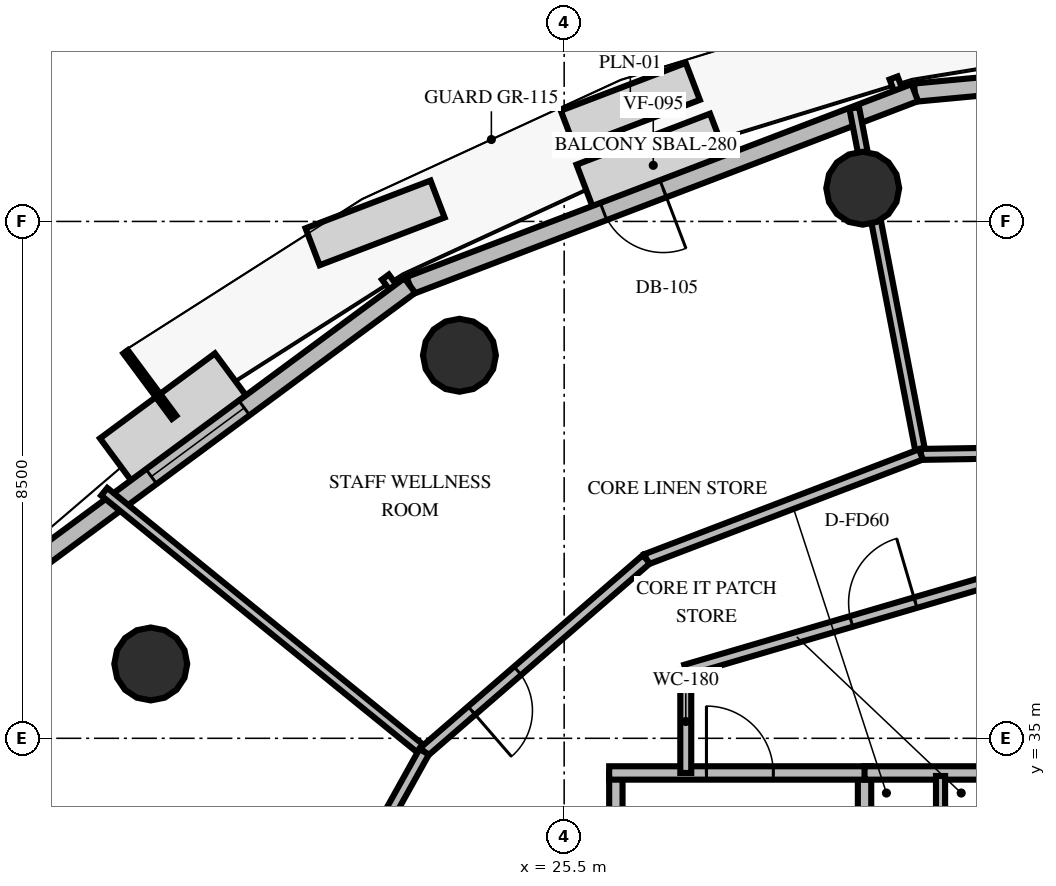
"""IFC4 building model, lengths in metres.
Left out: names, types, materials, properties, quantities, classifications, styles, units other than length and angle.
Written with IfcOpenShell. Run it as: python <this file> out.ifc"""

import sys

from ifc_helpers import new_model, si_unit, direction, frame, frame_2d, origin, origin_2d, place, context, subcontext, project, spatial, rectangle, circle, extrude, element, fill, save


model = new_model("IFC4")
c1 = context("Model", 3, precision=1e-05, world=origin(), true_north=direction((0.0, 1.0)))
c2 = subcontext(c1, "Body", "Model", "MODEL_VIEW")
j1 = project(units=[si_unit("LENGTHUNIT", "METRE"), si_unit("PLANEANGLEUNIT", "RADIAN")], contexts=[c1])
p1 = place(None, origin())
s1 = spatial("IfcSite", under=j1, at=p1, CompositionType="ELEMENT")
p2 = place(p1, origin())
s2 = spatial("IfcBuilding", under=s1, at=p2, CompositionType="ELEMENT")
p3 = place(p2, frame((0.0, 0.0, 121.8)))
s3 = spatial("IfcBuildingStorey", under=s2, at=p3, CompositionType="ELEMENT", Elevation=121.8)
for number, where, z_axis, x_axis in (
    (1, (30.41, 44.046, 0.0), (0.0, 0.0, 1.0), (1.0, 0.0, 0.0)),
    (2, (23.778, 41.299, 0.0), (0.0, 0.0, 1.0), (1.0, 0.0, 0.0)),
    (3, (18.701, 36.222, 0.0), (0.0, 0.0, 1.0), (1.0, 0.0, 0.0)),
):
    element("IfcColumn", number, at=place(p3, frame(where, z_axis=z_axis, x_axis=x_axis)), inside=s3, PredefinedType="COLUMN", context=c2, shape_type="SweptSolid", body=[
        extrude(circle(Radius=0.6, at=origin_2d()), origin(), (0.0, 0.0, 1.0), 4.0),
    ])
p4 = place(p3, frame((39.903, 46.424, 0.0), z_axis=(0.0, 0.0, 1.0), x_axis=(-0.995678666902, -0.092865452549, 0.0)))
e4 = element("IfcWall", 4, at=p4, inside=s3, PredefinedType="SOLIDWALL", context=c2, shape_type="SweptSolid", body=[
    extrude(rectangle(XDim=8.673, YDim=0.3, at=frame_2d((4.336, 0.0))), origin(), (0.0, 0.0, 1.0), 2.9),
])
p5 = place(p4, frame((3.386, 0.0, 0.8)))
e5 = element("IfcOpeningElement", 5, at=p5, cuts=e4, PredefinedType="OPENING", context=c2, shape_type="SweptSolid", body=[
    extrude(rectangle(XDim=1.9, YDim=1.95, at=frame_2d((0.95, 0.975))), frame((0.0, 0.16, 0.0), z_axis=(0.0, -1.0, 0.0), x_axis=(1.0, 0.0, 0.0)), (0.0, 0.0, 1.0), 0.32),
])
p6 = place(p3, frame((31.267, 45.618, 0.0), z_axis=(0.0, 0.0, 1.0), x_axis=(-0.934198586352, -0.356753418003, 0.0)))
e6 = element("IfcWall", 6, at=p6, inside=s3, PredefinedType="SOLIDWALL", context=c2, shape_type="SweptSolid", body=[
    extrude(rectangle(XDim=8.891, YDim=0.3, at=frame_2d((4.445, 0.0))), origin(), (0.0, 0.0, 1.0), 2.9),
])
p7 = place(p6, frame((4.43, 0.0, 0.0)))
e7 = element("IfcOpeningElement", 7, at=p7, cuts=e6, PredefinedType="OPENING", context=c2, shape_type="SweptSolid", body=[
    extrude(rectangle(XDim=1.05, YDim=2.15, at=frame_2d((0.525, 1.075))), frame((0.0, 0.16, 0.0), z_axis=(0.0, -1.0, 0.0), x_axis=(1.0, 0.0, 0.0)), (0.0, 0.0, 1.0), 0.32),
])
p8 = place(p3, frame((22.961, 42.446, 0.0), z_axis=(0.0, 0.0, 1.0), x_axis=(-0.804159175469, -0.594414014395, 0.0)))
e8 = element("IfcWall", 8, at=p8, inside=s3, PredefinedType="SOLIDWALL", context=c2, shape_type="SweptSolid", body=[
    extrude(rectangle(XDim=8.673, YDim=0.3, at=frame_2d((4.336, 0.0))), origin(), (0.0, 0.0, 1.0), 2.9),
])
p9 = place(p8, frame((3.386, 0.0, 0.8)))
e9 = element("IfcOpeningElement", 9, at=p9, cuts=e8, PredefinedType="OPENING", context=c2, shape_type="SweptSolid", body=[
    extrude(rectangle(XDim=1.9, YDim=1.95, at=frame_2d((0.95, 0.975))), frame((0.0, 0.16, 0.0), z_axis=(0.0, -1.0, 0.0), x_axis=(1.0, 0.0, 0.0)), (0.0, 0.0, 1.0), 0.32),
])
p10 = place(p3, frame((26.35, 30.05, 0.0), z_axis=(0.0, 0.0, 1.0), x_axis=(0.0, 1.0, 0.0)))
e10 = element("IfcWall", 10, at=p10, inside=s3, PredefinedType="SOLIDWALL", context=c2, shape_type="SweptSolid", body=[
    extrude(rectangle(XDim=4.38, YDim=0.22, at=frame_2d((2.19, 0.0))), origin(), (0.0, 0.0, 1.0), 2.8),
])
p11 = place(p3, frame((30.44, 30.05, 0.0), z_axis=(0.0, 0.0, 1.0), x_axis=(0.0, 1.0, 0.0)))
e11 = element("IfcWall", 11, at=p11, inside=s3, PredefinedType="SOLIDWALL", context=c2, shape_type="SweptSolid", body=[
    extrude(rectangle(XDim=4.38, YDim=0.22, at=frame_2d((2.19, 0.0))), origin(), (0.0, 0.0, 1.0), 2.8),
])
p12 = place(p11, frame((0.8, 0.0, 0.0)))
e12 = element("IfcOpeningElement", 12, at=p12, cuts=e11, PredefinedType="OPENING", context=c2, shape_type="SweptSolid", body=[
    extrude(rectangle(XDim=1.05, YDim=2.1, at=frame_2d((0.525, 1.05))), frame((0.0, 0.12, 0.0), z_axis=(0.0, -1.0, 0.0), x_axis=(1.0, 0.0, 0.0)), (0.0, 0.0, 1.0), 0.24),
])
p13 = place(p3, frame((26.24, 34.43, 0.0), z_axis=(0.0, 0.0, 1.0), x_axis=(1.0, 0.0, 0.0)))
e13 = element("IfcWall", 13, at=p13, inside=s3, PredefinedType="SOLIDWALL", context=c2, shape_type="SweptSolid", body=[
    extrude(rectangle(XDim=4.31, YDim=0.22, at=frame_2d((2.155, 0.0))), origin(), (0.0, 0.0, 1.0), 2.8),
])
p14 = place(p13, frame((1.6, 0.0, 0.0)))
e14 = element("IfcOpeningElement", 14, at=p14, cuts=e13, PredefinedType="OPENING", context=c2, shape_type="SweptSolid", body=[
    extrude(rectangle(XDim=1.1, YDim=2.15, at=frame_2d((0.55, 1.075))), frame((0.0, 0.12, 0.0), z_axis=(0.0, -1.0, 0.0), x_axis=(1.0, 0.0, 0.0)), (0.0, 0.0, 1.0), 0.24),
])
p15 = place(p3, frame((30.44, 34.43, 0.0), z_axis=(0.0, 0.0, 1.0), x_axis=(1.0, 0.0, 0.0)))
e15 = element("IfcWall", 15, at=p15, inside=s3, PredefinedType="SOLIDWALL", context=c2, shape_type="SweptSolid", body=[
    extrude(rectangle(XDim=7.12, YDim=0.22, at=frame_2d((3.56, 0.0))), origin(), (0.0, 0.0, 1.0), 2.8),
])
p16 = place(p15, frame((3.01, 0.0, 0.0)))
e16 = element("IfcOpeningElement", 16, at=p16, cuts=e15, PredefinedType="OPENING", context=c2, shape_type="SweptSolid", body=[
    extrude(rectangle(XDim=1.1, YDim=2.15, at=frame_2d((0.55, 1.075))), frame((0.0, 0.12, 0.0), z_axis=(0.0, -1.0, 0.0), x_axis=(1.0, 0.0, 0.0)), (0.0, 0.0, 1.0), 0.24),
])
p17 = place(p3, frame((31.69, 32.05, 0.0), z_axis=(0.0, 0.0, 1.0), x_axis=(0.0, 1.0, 0.0)))
e17 = element("IfcWall", 17, at=p17, inside=s3, PredefinedType="PARTITIONING", context=c2, shape_type="SweptSolid", body=[
    extrude(rectangle(XDim=2.33, YDim=0.15, at=frame_2d((1.165, 0.0))), origin(), (0.0, 0.0, 1.0), 2.8),
])
p18 = place(p17, frame((0.65, 0.0, 0.0)))
e18 = element("IfcOpeningElement", 18, at=p18, cuts=e17, PredefinedType="OPENING", context=c2, shape_type="SweptSolid", body=[
    extrude(rectangle(XDim=0.86, YDim=2.05, at=frame_2d((0.43, 1.025))), frame((0.0, 0.085, 0.0), z_axis=(0.0, -1.0, 0.0), x_axis=(1.0, 0.0, 0.0)), (0.0, 0.0, 1.0), 0.17),
])
p19 = place(p3, frame((27.5, 34.43, 0.0), z_axis=(0.0, 0.0, 1.0), x_axis=(0.0, 1.0, 0.0)))
e19 = element("IfcWall", 19, at=p19, inside=s3, PredefinedType="PARTITIONING", context=c2, shape_type="SweptSolid", body=[
    extrude(rectangle(XDim=1.693, YDim=0.18, at=frame_2d((0.846, 0.0))), origin(), (0.0, 0.0, 1.0), 2.8),
])
p20 = place(p3, frame((27.5, 36.123, 0.0), z_axis=(0.0, 0.0, 1.0), x_axis=(0.959546654541, 0.281549671923, 0.0)))
e20 = element("IfcWall", 20, at=p20, inside=s3, PredefinedType="PARTITIONING", context=c2, shape_type="SweptSolid", body=[
    extrude(rectangle(XDim=6.774, YDim=0.18, at=frame_2d((3.387, 0.0))), origin(), (0.0, 0.0, 1.0), 2.8),
])
p21 = place(p20, frame((2.837, 0.0, 0.0)))
e21 = element("IfcOpeningElement", 21, at=p21, cuts=e20, PredefinedType="OPENING", context=c2, shape_type="SweptSolid", body=[
    extrude(rectangle(XDim=1.1, YDim=2.15, at=frame_2d((0.55, 1.075))), frame((0.0, 0.1, 0.0), z_axis=(0.0, -1.0, 0.0), x_axis=(1.0, 0.0, 0.0)), (0.0, 0.0, 1.0), 0.2),
])
p22 = place(p3, frame((31.368, 39.669, 0.0), z_axis=(0.0, 0.0, 1.0), x_axis=(-0.18909703684, 0.981958405768, 0.0)))
e22 = element("IfcWall", 22, at=p22, inside=s3, PredefinedType="PARTITIONING", context=c2, shape_type="SweptSolid", body=[
    extrude(rectangle(XDim=5.803, YDim=0.16, at=frame_2d((2.902, 0.0))), origin(), (0.0, 0.0, 1.0), 2.8),
])
p23 = place(p3, frame((36.202, 39.745, 0.0), z_axis=(0.0, 0.0, 1.0), x_axis=(-0.999876654329, -0.015705926537, 0.0)))
e23 = element("IfcWall", 23, at=p23, inside=s3, PredefinedType="PARTITIONING", context=c2, shape_type="SweptSolid", body=[
    extrude(rectangle(XDim=4.834, YDim=0.18, at=frame_2d((2.417, 0.0))), origin(), (0.0, 0.0, 1.0), 2.8),
])
p24 = place(p3, frame((23.198, 34.779, 0.0), z_axis=(0.0, 0.0, 1.0), x_axis=(-0.776061128034, 0.630657692854, 0.0)))
e24 = element("IfcWall", 24, at=p24, inside=s3, PredefinedType="PARTITIONING", context=c2, shape_type="SweptSolid", body=[
    extrude(rectangle(XDim=6.78, YDim=0.16, at=frame_2d((3.39, 0.0))), origin(), (0.0, 0.0, 1.0), 2.8),
])
p25 = place(p3, frame((31.368, 39.669, 0.0), z_axis=(0.0, 0.0, 1.0), x_axis=(-0.934205840652, -0.356734421232, 0.0)))
e25 = element("IfcWall", 25, at=p25, inside=s3, PredefinedType="PARTITIONING", context=c2, shape_type="SweptSolid", body=[
    extrude(rectangle(XDim=4.834, YDim=0.18, at=frame_2d((2.417, 0.0))), origin(), (0.0, 0.0, 1.0), 2.8),
])
p26 = place(p3, frame((26.852, 37.944, 0.0), z_axis=(0.0, 0.0, 1.0), x_axis=(-0.755849022926, -0.654745946564, 0.0)))
e26 = element("IfcWall", 26, at=p26, inside=s3, PredefinedType="PARTITIONING", context=c2, shape_type="SweptSolid", body=[
    extrude(rectangle(XDim=4.834, YDim=0.18, at=frame_2d((2.417, 0.0))), origin(), (0.0, 0.0, 1.0), 2.8),
])
p27 = place(p26, frame((2.801, 0.0, 0.0)))
e27 = element("IfcOpeningElement", 27, at=p27, cuts=e26, PredefinedType="OPENING", context=c2, shape_type="SweptSolid", body=[
    extrude(rectangle(XDim=1.0, YDim=2.15, at=frame_2d((0.5, 1.075))), frame((0.0, 0.1, 0.0), z_axis=(0.0, -1.0, 0.0), x_axis=(1.0, 0.0, 0.0)), (0.0, 0.0, 1.0), 0.2),
])
p28 = place(p3, frame((23.198, 34.779, 0.0), z_axis=(0.0, 0.0, 1.0), x_axis=(-0.486367394504, -0.873754403459, 0.0)))
e28 = element("IfcWall", 28, at=p28, inside=s3, PredefinedType="PARTITIONING", context=c2, shape_type="SweptSolid", body=[
    extrude(rectangle(XDim=4.834, YDim=0.18, at=frame_2d((2.417, 0.0))), origin(), (0.0, 0.0, 1.0), 2.8),
])
p29 = place(p28, frame((2.801, 0.0, 0.0)))
e29 = element("IfcOpeningElement", 29, at=p29, cuts=e28, PredefinedType="OPENING", context=c2, shape_type="SweptSolid", body=[
    extrude(rectangle(XDim=1.0, YDim=2.15, at=frame_2d((0.5, 1.075))), frame((0.0, 0.1, 0.0), z_axis=(0.0, -1.0, 0.0), x_axis=(1.0, 0.0, 0.0)), (0.0, 0.0, 1.0), 0.2),
])
p30 = place(p7, origin())
e30 = element("IfcDoor", 30, at=p30, inside=s3, OperationType="SINGLE_SWING_LEFT", PredefinedType="DOOR", context=c2, shape_type="SweptSolid", body=[
    extrude(rectangle(XDim=1.05, YDim=2.15, at=frame_2d((0.525, 1.075))), frame((0.0, 0.025, 0.0), z_axis=(0.0, -1.0, 0.0), x_axis=(1.0, 0.0, 0.0)), (0.0, 0.0, 1.0), 0.05),
])
fill(e7, e30)
p31 = place(p9, origin())
e31 = element("IfcWindow", 31, at=p31, inside=s3, PartitioningType="SINGLE_PANEL", PredefinedType="WINDOW", context=c2, shape_type="SweptSolid", body=[
    extrude(rectangle(XDim=1.9, YDim=1.95, at=frame_2d((0.95, 0.975))), frame((0.0, 0.03, 0.0), z_axis=(0.0, -1.0, 0.0), x_axis=(1.0, 0.0, 0.0)), (0.0, 0.0, 1.0), 0.06),
])
fill(e9, e31)
p32 = place(p14, origin())
e32 = element("IfcDoor", 32, at=p32, inside=s3, OperationType="SINGLE_SWING_LEFT", PredefinedType="DOOR", context=c2, shape_type="SweptSolid", body=[
    extrude(rectangle(XDim=1.1, YDim=2.15, at=frame_2d((0.55, 1.075))), frame((0.0, 0.025, 0.0), z_axis=(0.0, -1.0, 0.0), x_axis=(1.0, 0.0, 0.0)), (0.0, 0.0, 1.0), 0.05),
])
fill(e14, e32)
p33 = place(p21, origin())
e33 = element("IfcDoor", 33, at=p33, inside=s3, OperationType="SINGLE_SWING_RIGHT", PredefinedType="DOOR", context=c2, shape_type="SweptSolid", body=[
    extrude(rectangle(XDim=1.1, YDim=2.15, at=frame_2d((0.55, 1.075))), frame((0.0, 0.025, 0.0), z_axis=(0.0, -1.0, 0.0), x_axis=(1.0, 0.0, 0.0)), (0.0, 0.0, 1.0), 0.05),
])
fill(e21, e33)
p34 = place(p27, origin())
e34 = element("IfcDoor", 34, at=p34, inside=s3, OperationType="SINGLE_SWING_RIGHT", PredefinedType="DOOR", context=c2, shape_type="SweptSolid", body=[
    extrude(rectangle(XDim=1.0, YDim=2.15, at=frame_2d((0.5, 1.075))), frame((0.0, 0.025, 0.0), z_axis=(0.0, -1.0, 0.0), x_axis=(1.0, 0.0, 0.0)), (0.0, 0.0, 1.0), 0.05),
])
fill(e27, e34)
save(model, sys.argv[1])
